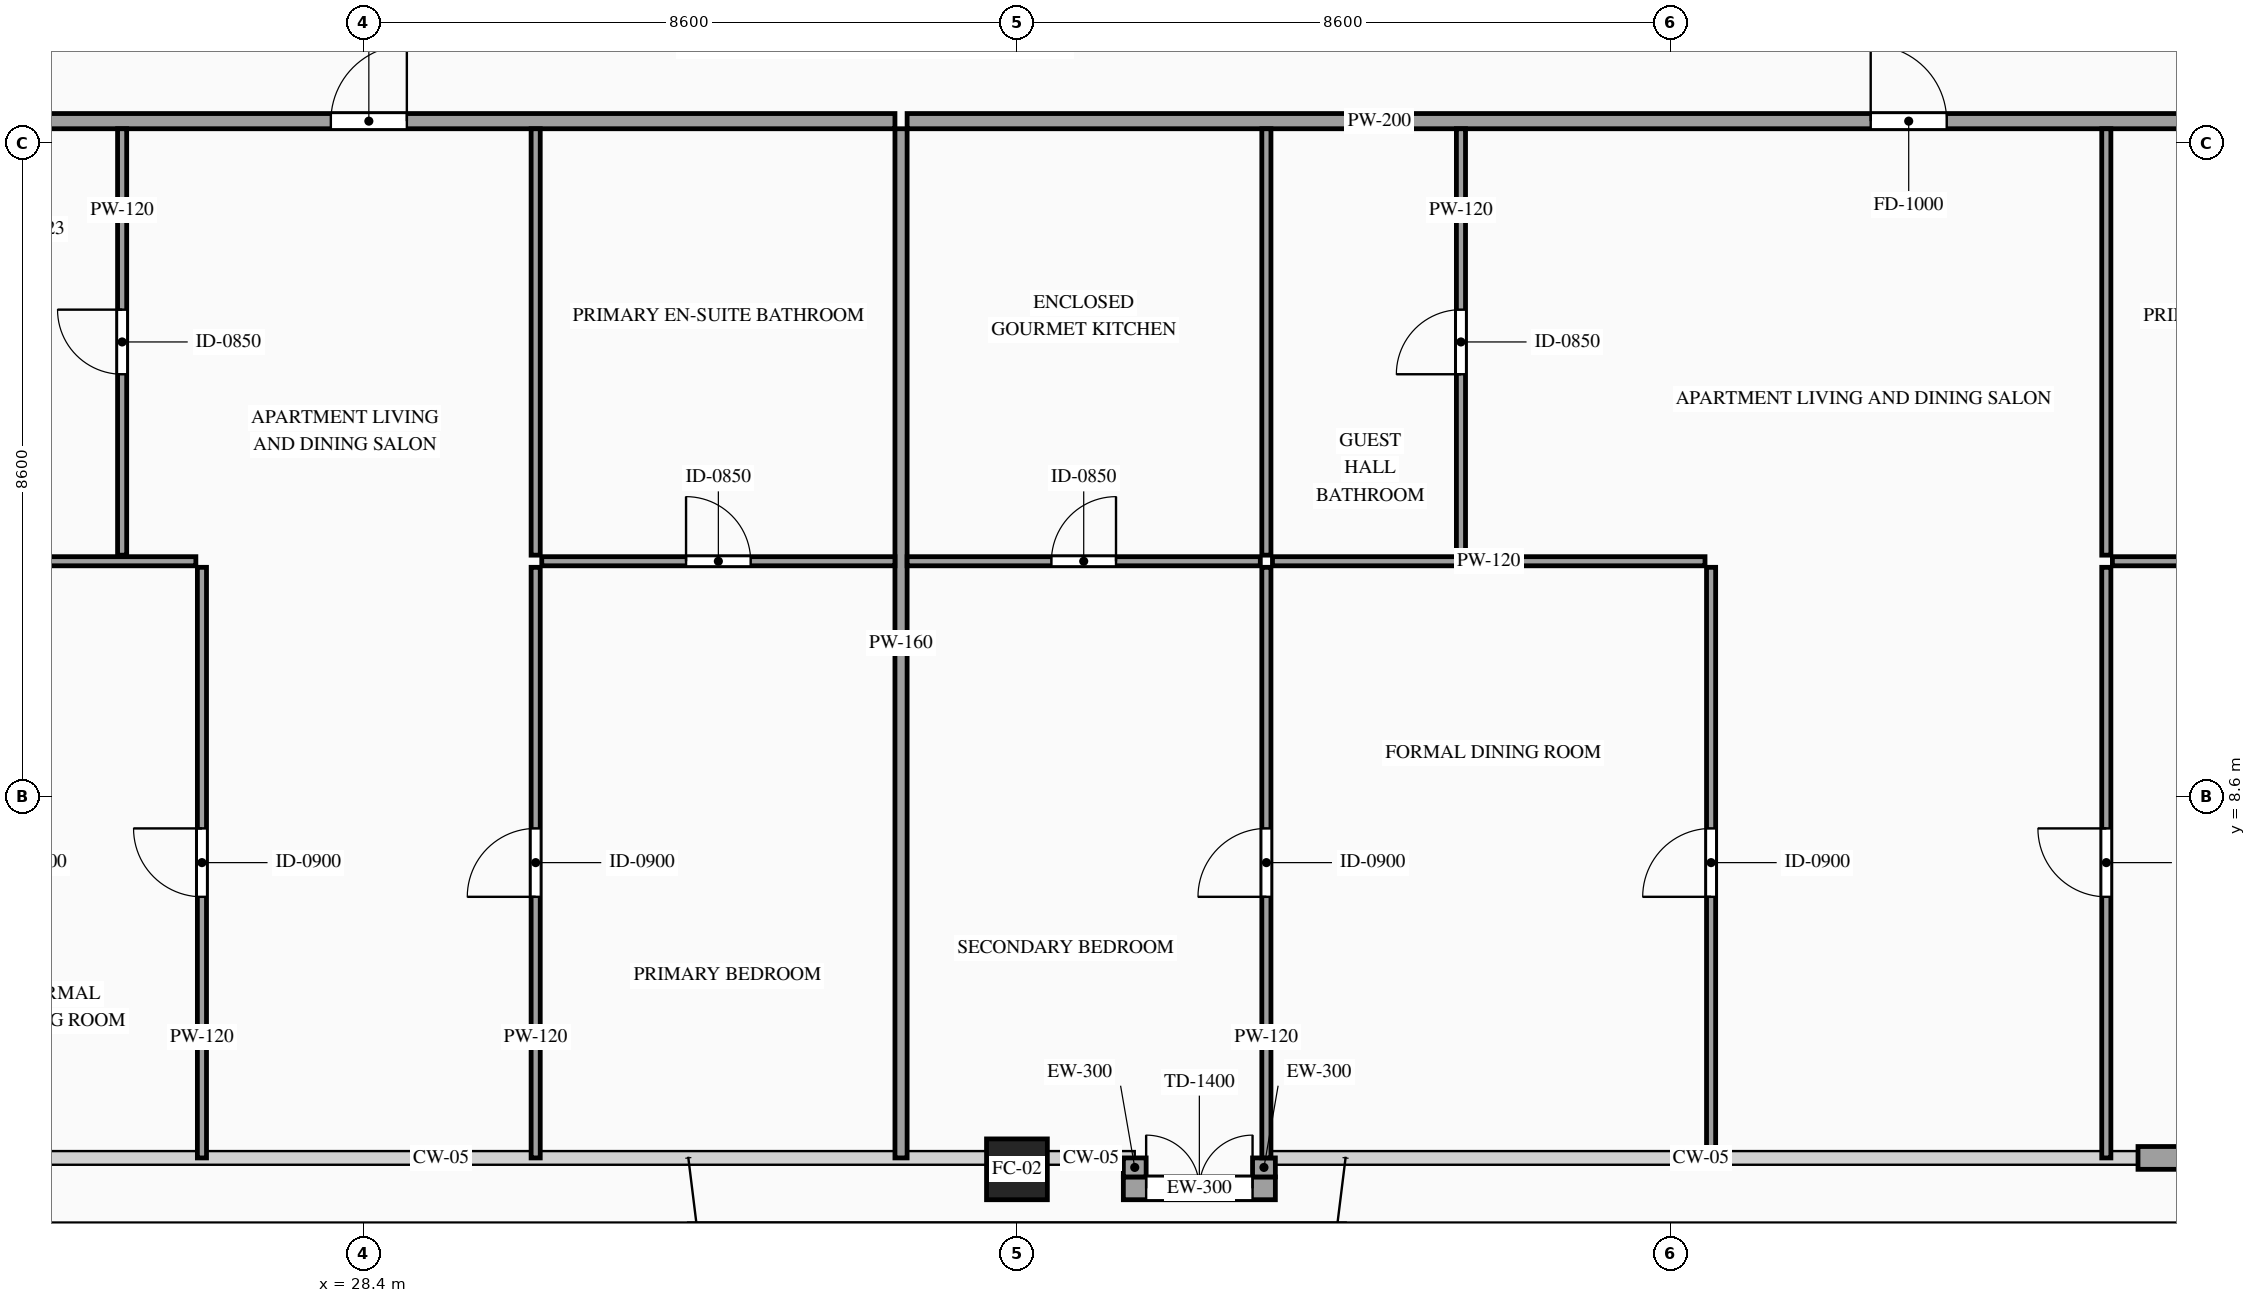
"""IFC4 building model, lengths in metres.
Left out: names, types, materials, properties, quantities, classifications, styles, units other than length and angle.
Written with IfcOpenShell. Run it as: python <this file> out.ifc"""

import sys

from ifc_helpers import new_model, si_unit, direction, frame, frame_2d, origin, origin_2d, place, context, subcontext, project, spatial, rectangle, hollow_rectangle, extrude, source, transform, mapped, element, fill, save


model = new_model("IFC4")
c1 = context("Model", 3, precision=1e-05, world=origin(), true_north=direction((0.0, 1.0)))
c2 = subcontext(c1, "Body", "Model", "MODEL_VIEW")
j1 = project(units=[si_unit("LENGTHUNIT", "METRE"), si_unit("PLANEANGLEUNIT", "RADIAN")], contexts=[c1])
p1 = place(None, origin())
s1 = spatial("IfcSite", under=j1, at=p1, CompositionType="ELEMENT")
p2 = place(p1, origin())
s2 = spatial("IfcBuilding", under=s1, at=p2, CompositionType="ELEMENT")
p3 = place(p2, frame((0.0, 0.0, 212.5)))
s3 = spatial("IfcBuildingStorey", under=s2, at=p3, CompositionType="ELEMENT", Elevation=212.5)
m1 = source(origin(), c2, "Body", "SweptSolid", [
    extrude(hollow_rectangle(XDim=0.8, YDim=0.8, WallThickness=0.036, at=origin_2d()), origin(), (0.0, 0.0, 1.0), 3.5),
])
p4 = place(p3, frame((37.0, 3.7, 0.0), z_axis=(0.0, 0.0, 1.0), x_axis=(1.0, 0.0, 0.0)))
e1 = element("IfcColumn", 1, at=p4, inside=s3, PredefinedType="COLUMN", context=c2, shape_type="MappedRepresentation", body=[
    mapped(m1, transform((0.0, 0.0, 0.0), scale=1.0)),
])
m2 = source(origin(), c2, "Body", "SweptSolid", [
    extrude(rectangle(XDim=3.05, YDim=0.3, at=frame_2d((1.525, 0.0))), origin(), (0.0, 0.0, 1.0), 2.835),
])
p5 = place(p3, frame((51.75, 3.85, 0.0), z_axis=(0.0, 0.0, 1.0), x_axis=(1.0, 0.0, 0.0)))
e2 = element("IfcWall", 2, at=p5, inside=s3, PredefinedType="SOLIDWALL", context=c2, shape_type="MappedRepresentation", body=[
    mapped(m2, transform((0.0, 0.0, 0.0), scale=1.0)),
])
p6 = place(p3, frame((38.4, 3.45, 0.0), z_axis=(0.0, 0.0, 1.0), x_axis=(1.0, 0.0, 0.0)))
e3 = element("IfcWall", 3, at=p6, inside=s3, PredefinedType="SOLIDWALL", context=c2, shape_type="SweptSolid", body=[
    extrude(rectangle(XDim=2.0, YDim=0.3, at=frame_2d((1.0, 0.0))), origin(), (0.0, 0.0, 1.0), 2.835),
])
p7 = place(p6, frame((0.3, 0.0, 0.0)))
e4 = element("IfcOpeningElement", 4, at=p7, cuts=e3, PredefinedType="OPENING", context=c2, shape_type="SweptSolid", body=[
    extrude(rectangle(XDim=1.4, YDim=2.3, at=frame_2d((0.7, 1.15))), frame((0.0, 0.165, 0.0), z_axis=(0.0, -1.0, 0.0), x_axis=(1.0, 0.0, 0.0)), (0.0, 0.0, 1.0), 0.33),
])
m3 = source(origin(), c2, "Body", "SweptSolid", [
    extrude(rectangle(XDim=0.25, YDim=0.3, at=frame_2d((0.125, 0.0))), origin(), (0.0, 0.0, 1.0), 3.28),
])
for number, where, z_axis, x_axis in (
    (5, (38.55, 3.85, 0.0), (0.0, 0.0, 1.0), (0.0, -1.0, 0.0)),
    (6, (40.25, 3.6, 0.0), (0.0, 0.0, 1.0), (0.0, 1.0, 0.0)),
):
    element("IfcWall", number, at=place(p3, frame(where, z_axis=z_axis, x_axis=x_axis)), inside=s3, PredefinedType="SOLIDWALL", context=c2, shape_type="MappedRepresentation", body=[
        mapped(m3, transform((0.0, 0.0, 0.0), scale=1.0)),
    ])
p8 = place(p3, frame((17.94, 17.49, 0.0), z_axis=(0.0, 0.0, 1.0), x_axis=(1.0, 0.0, 0.0)))
e7 = element("IfcWall", 7, at=p8, inside=s3, PredefinedType="PARTITIONING", context=c2, shape_type="SweptSolid", body=[
    extrude(rectangle(XDim=17.455, YDim=0.2, at=frame_2d((8.728, 0.0))), origin(), (0.0, 0.0, 1.0), 3.28),
])
p9 = place(p8, frame((10.033, 0.0, 0.0)))
e8 = element("IfcOpeningElement", 8, at=p9, cuts=e7, PredefinedType="OPENING", context=c2, shape_type="SweptSolid", body=[
    extrude(rectangle(XDim=1.0, YDim=2.2, at=frame_2d((0.5, 1.1))), frame((0.0, 0.115, 0.0), z_axis=(0.0, -1.0, 0.0), x_axis=(1.0, 0.0, 0.0)), (0.0, 0.0, 1.0), 0.23),
])
m4 = source(origin(), c2, "Body", "SweptSolid", [
    extrude(rectangle(XDim=13.54, YDim=0.16, at=frame_2d((6.77, 0.0))), origin(), (0.0, 0.0, 1.0), 3.28),
])
p10 = place(p3, frame((35.475, 3.85, 0.0), z_axis=(0.0, 0.0, 1.0), x_axis=(0.0, 1.0, 0.0)))
e9 = element("IfcWall", 9, at=p10, inside=s3, PredefinedType="PARTITIONING", context=c2, shape_type="MappedRepresentation", body=[
    mapped(m4, transform((0.0, 0.0, 0.0), scale=1.0)),
])
p11 = place(p3, frame((25.227, 11.78, 0.0), z_axis=(0.0, 0.0, 1.0), x_axis=(0.0, 1.0, 0.0)))
e10 = element("IfcWall", 10, at=p11, inside=s3, PredefinedType="PARTITIONING", context=c2, shape_type="SweptSolid", body=[
    extrude(rectangle(XDim=5.61, YDim=0.12, at=frame_2d((2.805, 0.0))), origin(), (0.0, 0.0, 1.0), 3.28),
])
p12 = place(p11, frame((2.38, 0.0, 0.0)))
e11 = element("IfcOpeningElement", 11, at=p12, cuts=e10, PredefinedType="OPENING", context=c2, shape_type="SweptSolid", body=[
    extrude(rectangle(XDim=0.85, YDim=2.1, at=frame_2d((0.425, 1.05))), frame((0.0, 0.075, 0.0), z_axis=(0.0, -1.0, 0.0), x_axis=(1.0, 0.0, 0.0)), (0.0, 0.0, 1.0), 0.15),
])
p13 = place(p3, frame((30.748, 11.7, 0.0), z_axis=(0.0, 0.0, 1.0), x_axis=(1.0, 0.0, 0.0)))
e12 = element("IfcWall", 12, at=p13, inside=s3, PredefinedType="PARTITIONING", context=c2, shape_type="SweptSolid", body=[
    extrude(rectangle(XDim=4.647, YDim=0.12, at=frame_2d((2.323, 0.0))), origin(), (0.0, 0.0, 1.0), 2.875),
])
p14 = place(p13, frame((1.898, 0.0, 0.0)))
e13 = element("IfcOpeningElement", 13, at=p14, cuts=e12, PredefinedType="OPENING", context=c2, shape_type="SweptSolid", body=[
    extrude(rectangle(XDim=0.85, YDim=2.1, at=frame_2d((0.425, 1.05))), frame((0.0, 0.075, 0.0), z_axis=(0.0, -1.0, 0.0), x_axis=(1.0, 0.0, 0.0)), (0.0, 0.0, 1.0), 0.15),
])
m5 = source(origin(), c2, "Body", "SweptSolid", [
    extrude(rectangle(XDim=5.61, YDim=0.12, at=frame_2d((2.805, 0.0))), origin(), (0.0, 0.0, 1.0), 3.28),
])
p15 = place(p3, frame((30.668, 11.78, 0.0), z_axis=(0.0, 0.0, 1.0), x_axis=(0.0, 1.0, 0.0)))
e14 = element("IfcWall", 14, at=p15, inside=s3, PredefinedType="PARTITIONING", context=c2, shape_type="MappedRepresentation", body=[
    mapped(m5, transform((0.0, 0.0, 0.0), scale=1.0)),
])
p16 = place(p3, frame((30.668, 3.85, 0.0), z_axis=(0.0, 0.0, 1.0), x_axis=(0.0, 1.0, 0.0)))
e15 = element("IfcWall", 15, at=p16, inside=s3, PredefinedType="PARTITIONING", context=c2, shape_type="SweptSolid", body=[
    extrude(rectangle(XDim=7.77, YDim=0.12, at=frame_2d((3.885, 0.0))), origin(), (0.0, 0.0, 1.0), 3.28),
])
p17 = place(p16, frame((3.435, 0.0, 0.0)))
e16 = element("IfcOpeningElement", 16, at=p17, cuts=e15, PredefinedType="OPENING", context=c2, shape_type="SweptSolid", body=[
    extrude(rectangle(XDim=0.9, YDim=2.15, at=frame_2d((0.45, 1.075))), frame((0.0, 0.075, 0.0), z_axis=(0.0, -1.0, 0.0), x_axis=(1.0, 0.0, 0.0)), (0.0, 0.0, 1.0), 0.15),
])
m6 = source(origin(), c2, "Body", "SweptSolid", [
    extrude(rectangle(XDim=3.45, YDim=0.12, at=frame_2d((1.725, 0.0))), origin(), (0.0, 0.0, 1.0), 2.875),
])
p18 = place(p3, frame((22.747, 11.7, 0.0), z_axis=(0.0, 0.0, 1.0), x_axis=(1.0, 0.0, 0.0)))
e17 = element("IfcWall", 17, at=p18, inside=s3, PredefinedType="PARTITIONING", context=c2, shape_type="MappedRepresentation", body=[
    mapped(m6, transform((0.0, 0.0, 0.0), scale=1.0)),
])
p19 = place(p3, frame((26.277, 3.85, 0.0), z_axis=(0.0, 0.0, 1.0), x_axis=(0.0, 1.0, 0.0)))
e18 = element("IfcWall", 18, at=p19, inside=s3, PredefinedType="PARTITIONING", context=c2, shape_type="SweptSolid", body=[
    extrude(rectangle(XDim=7.77, YDim=0.12, at=frame_2d((3.885, 0.0))), origin(), (0.0, 0.0, 1.0), 3.28),
])
p20 = place(p19, frame((3.435, 0.0, 0.0)))
e19 = element("IfcOpeningElement", 19, at=p20, cuts=e18, PredefinedType="OPENING", context=c2, shape_type="SweptSolid", body=[
    extrude(rectangle(XDim=0.9, YDim=2.15, at=frame_2d((0.45, 1.075))), frame((0.0, 0.075, 0.0), z_axis=(0.0, -1.0, 0.0), x_axis=(1.0, 0.0, 0.0)), (0.0, 0.0, 1.0), 0.15),
])
p21 = place(p3, frame((35.555, 17.49, 0.0), z_axis=(0.0, 0.0, 1.0), x_axis=(1.0, 0.0, 0.0)))
e20 = element("IfcWall", 20, at=p21, inside=s3, PredefinedType="PARTITIONING", context=c2, shape_type="SweptSolid", body=[
    extrude(rectangle(XDim=20.505, YDim=0.2, at=frame_2d((10.252, 0.0))), origin(), (0.0, 0.0, 1.0), 3.28),
])
p22 = place(p21, frame((12.678, 0.0, 0.0)))
e21 = element("IfcOpeningElement", 21, at=p22, cuts=e20, PredefinedType="OPENING", context=c2, shape_type="SweptSolid", body=[
    extrude(rectangle(XDim=1.0, YDim=2.2, at=frame_2d((0.5, 1.1))), frame((0.0, 0.115, 0.0), z_axis=(0.0, -1.0, 0.0), x_axis=(1.0, 0.0, 0.0)), (0.0, 0.0, 1.0), 0.23),
])
p23 = place(p3, frame((35.555, 11.7, 0.0), z_axis=(0.0, 0.0, 1.0), x_axis=(1.0, 0.0, 0.0)))
e22 = element("IfcWall", 22, at=p23, inside=s3, PredefinedType="PARTITIONING", context=c2, shape_type="SweptSolid", body=[
    extrude(rectangle(XDim=4.647, YDim=0.12, at=frame_2d((2.323, 0.0))), origin(), (0.0, 0.0, 1.0), 2.875),
])
p24 = place(p23, frame((1.898, 0.0, 0.0)))
e23 = element("IfcOpeningElement", 23, at=p24, cuts=e22, PredefinedType="OPENING", context=c2, shape_type="SweptSolid", body=[
    extrude(rectangle(XDim=0.85, YDim=2.1, at=frame_2d((0.425, 1.05))), frame((0.0, 0.075, 0.0), z_axis=(0.0, -1.0, 0.0), x_axis=(1.0, 0.0, 0.0)), (0.0, 0.0, 1.0), 0.15),
])
p25 = place(p3, frame((40.282, 11.78, 0.0), z_axis=(0.0, 0.0, 1.0), x_axis=(0.0, 1.0, 0.0)))
e24 = element("IfcWall", 24, at=p25, inside=s3, PredefinedType="PARTITIONING", context=c2, shape_type="MappedRepresentation", body=[
    mapped(m5, transform((0.0, 0.0, 0.0), scale=1.0)),
])
p26 = place(p3, frame((42.842, 11.78, 0.0), z_axis=(0.0, 0.0, 1.0), x_axis=(0.0, 1.0, 0.0)))
e25 = element("IfcWall", 25, at=p26, inside=s3, PredefinedType="PARTITIONING", context=c2, shape_type="SweptSolid", body=[
    extrude(rectangle(XDim=5.61, YDim=0.12, at=frame_2d((2.805, 0.0))), origin(), (0.0, 0.0, 1.0), 3.28),
])
p27 = place(p26, frame((2.38, 0.0, 0.0)))
e26 = element("IfcOpeningElement", 26, at=p27, cuts=e25, PredefinedType="OPENING", context=c2, shape_type="SweptSolid", body=[
    extrude(rectangle(XDim=0.85, YDim=2.1, at=frame_2d((0.425, 1.05))), frame((0.0, 0.075, 0.0), z_axis=(0.0, -1.0, 0.0), x_axis=(1.0, 0.0, 0.0)), (0.0, 0.0, 1.0), 0.15),
])
p28 = place(p3, frame((51.413, 11.7, 0.0), z_axis=(0.0, 0.0, 1.0), x_axis=(1.0, 0.0, 0.0)))
e27 = element("IfcWall", 27, at=p28, inside=s3, PredefinedType="PARTITIONING", context=c2, shape_type="SweptSolid", body=[
    extrude(rectangle(XDim=4.647, YDim=0.12, at=frame_2d((2.323, 0.0))), origin(), (0.0, 0.0, 1.0), 3.28),
])
p29 = place(p28, frame((1.898, 0.0, 0.0)))
e28 = element("IfcOpeningElement", 28, at=p29, cuts=e27, PredefinedType="OPENING", context=c2, shape_type="SweptSolid", body=[
    extrude(rectangle(XDim=0.85, YDim=2.1, at=frame_2d((0.425, 1.05))), frame((0.0, 0.075, 0.0), z_axis=(0.0, -1.0, 0.0), x_axis=(1.0, 0.0, 0.0)), (0.0, 0.0, 1.0), 0.15),
])
p30 = place(p3, frame((51.333, 11.78, 0.0), z_axis=(0.0, 0.0, 1.0), x_axis=(0.0, 1.0, 0.0)))
e29 = element("IfcWall", 29, at=p30, inside=s3, PredefinedType="PARTITIONING", context=c2, shape_type="MappedRepresentation", body=[
    mapped(m5, transform((0.0, 0.0, 0.0), scale=1.0)),
])
p31 = place(p3, frame((40.282, 3.85, 0.0), z_axis=(0.0, 0.0, 1.0), x_axis=(0.0, 1.0, 0.0)))
e30 = element("IfcWall", 30, at=p31, inside=s3, PredefinedType="PARTITIONING", context=c2, shape_type="SweptSolid", body=[
    extrude(rectangle(XDim=7.77, YDim=0.12, at=frame_2d((3.885, 0.0))), origin(), (0.0, 0.0, 1.0), 3.28),
])
p32 = place(p31, frame((3.435, 0.0, 0.0)))
e31 = element("IfcOpeningElement", 31, at=p32, cuts=e30, PredefinedType="OPENING", context=c2, shape_type="SweptSolid", body=[
    extrude(rectangle(XDim=0.9, YDim=2.15, at=frame_2d((0.45, 1.075))), frame((0.0, 0.075, 0.0), z_axis=(0.0, -1.0, 0.0), x_axis=(1.0, 0.0, 0.0)), (0.0, 0.0, 1.0), 0.15),
])
p33 = place(p3, frame((51.333, 3.85, 0.0), z_axis=(0.0, 0.0, 1.0), x_axis=(0.0, 1.0, 0.0)))
e32 = element("IfcWall", 32, at=p33, inside=s3, PredefinedType="PARTITIONING", context=c2, shape_type="SweptSolid", body=[
    extrude(rectangle(XDim=7.77, YDim=0.12, at=frame_2d((3.885, 0.0))), origin(), (0.0, 0.0, 1.0), 3.28),
])
p34 = place(p33, frame((3.435, 0.0, 0.0)))
e33 = element("IfcOpeningElement", 33, at=p34, cuts=e32, PredefinedType="OPENING", context=c2, shape_type="SweptSolid", body=[
    extrude(rectangle(XDim=0.9, YDim=2.15, at=frame_2d((0.45, 1.075))), frame((0.0, 0.075, 0.0), z_axis=(0.0, -1.0, 0.0), x_axis=(1.0, 0.0, 0.0)), (0.0, 0.0, 1.0), 0.15),
])
m7 = source(origin(), c2, "Body", "SweptSolid", [
    extrude(rectangle(XDim=5.691, YDim=0.12, at=frame_2d((2.845, 0.0))), origin(), (0.0, 0.0, 1.0), 2.875),
])
p35 = place(p3, frame((40.362, 11.7, 0.0), z_axis=(0.0, 0.0, 1.0), x_axis=(1.0, 0.0, 0.0)))
e34 = element("IfcWall", 34, at=p35, inside=s3, PredefinedType="PARTITIONING", context=c2, shape_type="MappedRepresentation", body=[
    mapped(m7, transform((0.0, 0.0, 0.0), scale=1.0)),
])
p36 = place(p3, frame((46.133, 3.85, 0.0), z_axis=(0.0, 0.0, 1.0), x_axis=(0.0, 1.0, 0.0)))
e35 = element("IfcWall", 35, at=p36, inside=s3, PredefinedType="PARTITIONING", context=c2, shape_type="SweptSolid", body=[
    extrude(rectangle(XDim=7.77, YDim=0.12, at=frame_2d((3.885, 0.0))), origin(), (0.0, 0.0, 1.0), 3.28),
])
p37 = place(p36, frame((3.435, 0.0, 0.0)))
e36 = element("IfcOpeningElement", 36, at=p37, cuts=e35, PredefinedType="OPENING", context=c2, shape_type="SweptSolid", body=[
    extrude(rectangle(XDim=0.9, YDim=2.15, at=frame_2d((0.45, 1.075))), frame((0.0, 0.075, 0.0), z_axis=(0.0, -1.0, 0.0), x_axis=(1.0, 0.0, 0.0)), (0.0, 0.0, 1.0), 0.15),
])
m8 = source(origin(), c2, "Body", "SweptSolid", [
    extrude(rectangle(XDim=1.4, YDim=2.3, at=frame_2d((0.7, 1.15))), frame((0.0, 0.025, 0.0), z_axis=(0.0, -1.0, 0.0), x_axis=(1.0, 0.0, 0.0)), (0.0, 0.0, 1.0), 0.05),
])
p38 = place(p7, origin())
e37 = element("IfcDoor", 37, at=p38, inside=s3, OperationType="DOUBLE_DOOR_SINGLE_SWING", PredefinedType="DOOR", context=c2, shape_type="MappedRepresentation", body=[
    mapped(m8, transform((0.0, 0.0, 0.0), scale=1.0)),
])
fill(e4, e37)
m9 = source(origin(), c2, "Body", "SweptSolid", [
    extrude(rectangle(XDim=1.0, YDim=2.2, at=frame_2d((0.5, 1.1))), frame((0.0, 0.025, 0.0), z_axis=(0.0, -1.0, 0.0), x_axis=(1.0, 0.0, 0.0)), (0.0, 0.0, 1.0), 0.05),
])
p39 = place(p9, origin())
e38 = element("IfcDoor", 38, at=p39, inside=s3, OperationType="SINGLE_SWING_RIGHT", PredefinedType="DOOR", context=c2, shape_type="MappedRepresentation", body=[
    mapped(m9, transform((0.0, 0.0, 0.0), scale=1.0)),
])
fill(e8, e38)
m10 = source(origin(), c2, "Body", "SweptSolid", [
    extrude(rectangle(XDim=0.85, YDim=2.1, at=frame_2d((0.425, 1.05))), frame((0.0, 0.025, 0.0), z_axis=(0.0, -1.0, 0.0), x_axis=(1.0, 0.0, 0.0)), (0.0, 0.0, 1.0), 0.05),
])
p40 = place(p12, origin())
e39 = element("IfcDoor", 39, at=p40, inside=s3, OperationType="SINGLE_SWING_RIGHT", PredefinedType="DOOR", context=c2, shape_type="MappedRepresentation", body=[
    mapped(m10, transform((0.0, 0.0, 0.0), scale=1.0)),
])
fill(e11, e39)
p41 = place(p14, origin())
e40 = element("IfcDoor", 40, at=p41, inside=s3, OperationType="SINGLE_SWING_LEFT", PredefinedType="DOOR", context=c2, shape_type="MappedRepresentation", body=[
    mapped(m10, transform((0.0, 0.0, 0.0), scale=1.0)),
])
fill(e13, e40)
m11 = source(origin(), c2, "Body", "SweptSolid", [
    extrude(rectangle(XDim=0.9, YDim=2.15, at=frame_2d((0.45, 1.075))), frame((0.0, 0.025, 0.0), z_axis=(0.0, -1.0, 0.0), x_axis=(1.0, 0.0, 0.0)), (0.0, 0.0, 1.0), 0.05),
])
p42 = place(p17, origin())
e41 = element("IfcDoor", 41, at=p42, inside=s3, OperationType="SINGLE_SWING_LEFT", PredefinedType="DOOR", context=c2, shape_type="MappedRepresentation", body=[
    mapped(m11, transform((0.0, 0.0, 0.0), scale=1.0)),
])
fill(e16, e41)
p43 = place(p20, origin())
e42 = element("IfcDoor", 42, at=p43, inside=s3, OperationType="SINGLE_SWING_RIGHT", PredefinedType="DOOR", context=c2, shape_type="MappedRepresentation", body=[
    mapped(m11, transform((0.0, 0.0, 0.0), scale=1.0)),
])
fill(e19, e42)
p44 = place(p22, origin())
e43 = element("IfcDoor", 43, at=p44, inside=s3, OperationType="SINGLE_SWING_LEFT", PredefinedType="DOOR", context=c2, shape_type="MappedRepresentation", body=[
    mapped(m9, transform((0.0, 0.0, 0.0), scale=1.0)),
])
fill(e21, e43)
p45 = place(p24, origin())
e44 = element("IfcDoor", 44, at=p45, inside=s3, OperationType="SINGLE_SWING_RIGHT", PredefinedType="DOOR", context=c2, shape_type="MappedRepresentation", body=[
    mapped(m10, transform((0.0, 0.0, 0.0), scale=1.0)),
])
fill(e23, e44)
p46 = place(p27, origin())
e45 = element("IfcDoor", 45, at=p46, inside=s3, OperationType="SINGLE_SWING_LEFT", PredefinedType="DOOR", context=c2, shape_type="MappedRepresentation", body=[
    mapped(m10, transform((0.0, 0.0, 0.0), scale=1.0)),
])
fill(e26, e45)
p47 = place(p32, origin())
e46 = element("IfcDoor", 46, at=p47, inside=s3, OperationType="SINGLE_SWING_LEFT", PredefinedType="DOOR", context=c2, shape_type="MappedRepresentation", body=[
    mapped(m11, transform((0.0, 0.0, 0.0), scale=1.0)),
])
fill(e31, e46)
p48 = place(p34, origin())
e47 = element("IfcDoor", 47, at=p48, inside=s3, OperationType="SINGLE_SWING_RIGHT", PredefinedType="DOOR", context=c2, shape_type="MappedRepresentation", body=[
    mapped(m11, transform((0.0, 0.0, 0.0), scale=1.0)),
])
fill(e33, e47)
p49 = place(p37, origin())
e48 = element("IfcDoor", 48, at=p49, inside=s3, OperationType="SINGLE_SWING_LEFT", PredefinedType="DOOR", context=c2, shape_type="MappedRepresentation", body=[
    mapped(m11, transform((0.0, 0.0, 0.0), scale=1.0)),
])
fill(e36, e48)
save(model, sys.argv[1])
